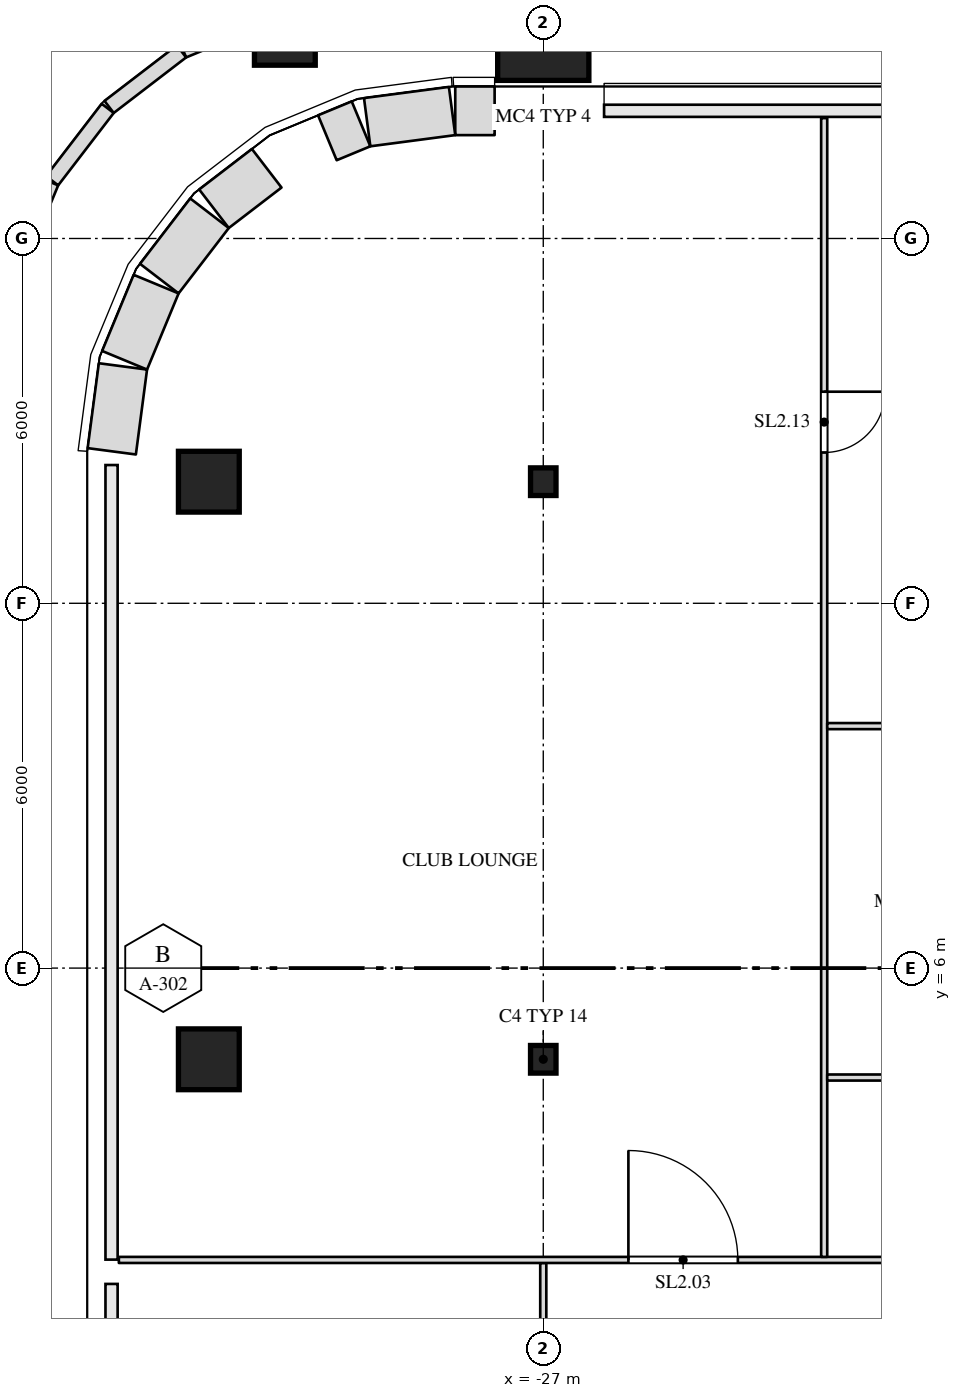
"""IFC4 building model, lengths in metres.
Left out: names, types, materials, properties, quantities, classifications, styles, units other than length and angle.
Written with IfcOpenShell. Run it as: python <this file> out.ifc"""

import sys

from ifc_helpers import new_model, si_unit, direction, frame, frame_2d, origin, origin_2d, place, context, subcontext, project, spatial, rectangle, i_section, extrude, clip, halfspace, element, fill, save


model = new_model("IFC4")
c1 = context("Model", 3, precision=1e-05, world=origin(), true_north=direction((0.0, 1.0)))
c2 = subcontext(c1, "Body", "Model", "MODEL_VIEW")
j1 = project(units=[si_unit("LENGTHUNIT", "METRE"), si_unit("PLANEANGLEUNIT", "RADIAN")], contexts=[c1])
p1 = place(None, origin())
s1 = spatial("IfcSite", under=j1, at=p1, CompositionType="ELEMENT")
p2 = place(p1, origin())
s2 = spatial("IfcBuilding", under=s1, at=p2, CompositionType="ELEMENT")
p3 = place(p2, frame((0.0, 0.0, 156.5)))
s3 = spatial("IfcBuildingStorey", under=s2, at=p3, CompositionType="ELEMENT", Elevation=156.5)
p4 = place(p3, frame((-32.5, 4.5, 0.0), z_axis=(0.0, 0.0, 1.0), x_axis=(1.0, 0.0, 0.0)))
e1 = element("IfcColumn", 1, at=p4, inside=s3, PredefinedType="COLUMN", context=c2, shape_type="SweptSolid", body=[
    extrude(rectangle(XDim=1.0, YDim=1.0, at=origin_2d()), origin(), (0.0, 0.0, 1.0), 4.0),
])
p5 = place(p3, frame((-27.0, 4.5, 0.0), z_axis=(0.0, 0.0, 1.0), x_axis=(1.0, 0.0, 0.0)))
e2 = element("IfcColumn", 2, at=p5, inside=s3, PredefinedType="COLUMN", context=c2, shape_type="SweptSolid", body=[
    extrude(i_section(OverallWidth=0.419, OverallDepth=0.455, WebThickness=0.042, FlangeThickness=0.068, at=origin_2d()), origin(), (0.0, 0.0, 1.0), 4.0),
])
p6 = place(p3, frame((-32.5, 14.0, 0.0), z_axis=(0.0, 0.0, 1.0), x_axis=(1.0, 0.0, 0.0)))
e3 = element("IfcColumn", 3, at=p6, inside=s3, PredefinedType="COLUMN", context=c2, shape_type="SweptSolid", body=[
    extrude(rectangle(XDim=1.0, YDim=1.0, at=origin_2d()), origin(), (0.0, 0.0, 1.0), 4.0),
])
p7 = place(p3, frame((-27.0, 14.0, 0.0), z_axis=(0.0, 0.0, 1.0), x_axis=(1.0, 0.0, 0.0)))
e4 = element("IfcColumn", 4, at=p7, inside=s3, PredefinedType="COLUMN", context=c2, shape_type="SweptSolid", body=[
    extrude(i_section(OverallWidth=0.419, OverallDepth=0.455, WebThickness=0.042, FlangeThickness=0.068, at=origin_2d()), origin(), (0.0, 0.0, 1.0), 4.0),
])
p8 = place(p3, frame((-31.25, 20.0, 0.0), z_axis=(0.0, 0.747409318684, 0.66436383883), x_axis=(-1.0, 0.0, 0.0)))
e5 = element("IfcColumn", 5, at=p8, inside=s3, PredefinedType="COLUMN", context=c2, shape_type="Clipping", body=[
    clip(extrude(rectangle(XDim=1.0, YDim=1.0, at=origin_2d()), origin(), (0.0, 0.0, 1.0), 6.021), halfspace(frame((0.0, 0.0, 0.562)), True)),
])
p9 = place(p3, frame((-27.0, 20.0, 0.0), z_axis=(0.0, 0.747409318684, 0.66436383883), x_axis=(-1.0, 0.0, 0.0)))
e6 = element("IfcColumn", 6, at=p9, inside=s3, PredefinedType="COLUMN", context=c2, shape_type="Clipping", body=[
    clip(extrude(rectangle(XDim=1.5, YDim=1.5, at=origin_2d()), origin(), (0.0, 0.0, 1.0), 6.021), halfspace(frame((0.0, 0.0, 0.844)), True)),
])
p10 = place(p3, frame((-27.0, -2.0, 0.0), z_axis=(0.0, 0.0, 1.0), x_axis=(0.0, 1.0, 0.0)))
e7 = element("IfcWall", 7, at=p10, inside=s3, PredefinedType="PARTITIONING", context=c2, shape_type="SweptSolid", body=[
    extrude(rectangle(XDim=3.15, YDim=0.1, at=frame_2d((1.575, 0.0))), origin(), (0.0, 0.0, 1.0), 3.038),
])
p11 = place(p10, frame((1.1, 0.0, 0.0)))
e8 = element("IfcOpeningElement", 8, at=p11, cuts=e7, PredefinedType="OPENING", context=c2, shape_type="SweptSolid", body=[
    extrude(rectangle(XDim=1.0, YDim=2.1, at=frame_2d((0.5, 1.05))), frame((0.0, 0.062, 0.0), z_axis=(0.0, -1.0, 0.0), x_axis=(1.0, 0.0, 0.0)), (0.0, 0.0, 1.0), 0.124),
])
p12 = place(p3, frame((-33.98, 1.2, 0.0), z_axis=(0.0, 0.0, 1.0), x_axis=(1.0, 0.0, 0.0)))
e9 = element("IfcWall", 9, at=p12, inside=s3, PredefinedType="PARTITIONING", context=c2, shape_type="SweptSolid", body=[
    extrude(rectangle(XDim=67.976, YDim=0.1, at=frame_2d((33.988, 0.0))), origin(), (0.0, 0.0, 1.0), 3.65),
])
p13 = place(p12, frame((8.38, 0.0, 0.0)))
e10 = element("IfcOpeningElement", 10, at=p13, cuts=e9, PredefinedType="OPENING", context=c2, shape_type="SweptSolid", body=[
    extrude(rectangle(XDim=1.8, YDim=2.1, at=frame_2d((0.9, 1.05))), frame((0.0, 0.062, 0.0), z_axis=(0.0, -1.0, 0.0), x_axis=(1.0, 0.0, 0.0)), (0.0, 0.0, 1.0), 0.124),
])
p14 = place(p12, frame((15.5, 0.0, 0.0)))
e11 = element("IfcOpeningElement", 11, at=p14, cuts=e9, PredefinedType="OPENING", context=c2, shape_type="SweptSolid", body=[
    extrude(rectangle(XDim=1.0, YDim=2.1, at=frame_2d((0.5, 1.05))), frame((0.0, 0.062, 0.0), z_axis=(0.0, -1.0, 0.0), x_axis=(1.0, 0.0, 0.0)), (0.0, 0.0, 1.0), 0.124),
])
p15 = place(p12, frame((24.01, 0.0, 0.0)))
e12 = element("IfcOpeningElement", 12, at=p15, cuts=e9, PredefinedType="OPENING", context=c2, shape_type="SweptSolid", body=[
    extrude(rectangle(XDim=1.8, YDim=2.1, at=frame_2d((0.9, 1.05))), frame((0.0, 0.062, 0.0), z_axis=(0.0, -1.0, 0.0), x_axis=(1.0, 0.0, 0.0)), (0.0, 0.0, 1.0), 0.124),
])
p16 = place(p12, frame((31.23, 0.0, 0.0)))
e13 = element("IfcOpeningElement", 13, at=p16, cuts=e9, PredefinedType="OPENING", context=c2, shape_type="SweptSolid", body=[
    extrude(rectangle(XDim=1.8, YDim=2.1, at=frame_2d((0.9, 1.05))), frame((0.0, 0.062, 0.0), z_axis=(0.0, -1.0, 0.0), x_axis=(1.0, 0.0, 0.0)), (0.0, 0.0, 1.0), 0.124),
])
p17 = place(p12, frame((44.66, 0.0, 0.0)))
e14 = element("IfcOpeningElement", 14, at=p17, cuts=e9, PredefinedType="OPENING", context=c2, shape_type="SweptSolid", body=[
    extrude(rectangle(XDim=1.8, YDim=2.1, at=frame_2d((0.9, 1.05))), frame((0.0, 0.062, 0.0), z_axis=(0.0, -1.0, 0.0), x_axis=(1.0, 0.0, 0.0)), (0.0, 0.0, 1.0), 0.124),
])
p18 = place(p12, frame((55.93, 0.0, 0.0)))
e15 = element("IfcOpeningElement", 15, at=p18, cuts=e9, PredefinedType="OPENING", context=c2, shape_type="SweptSolid", body=[
    extrude(rectangle(XDim=1.8, YDim=2.1, at=frame_2d((0.9, 1.05))), frame((0.0, 0.062, 0.0), z_axis=(0.0, -1.0, 0.0), x_axis=(1.0, 0.0, 0.0)), (0.0, 0.0, 1.0), 0.124),
])
p19 = place(p3, frame((-22.38, 1.25, 0.0), z_axis=(0.0, 0.0, 1.0), x_axis=(0.0, 1.0, 0.0)))
e16 = element("IfcWall", 16, at=p19, inside=s3, PredefinedType="PARTITIONING", context=c2, shape_type="SweptSolid", body=[
    extrude(rectangle(XDim=18.73, YDim=0.1, at=frame_2d((9.365, 0.0))), origin(), (0.0, 0.0, 1.0), 3.65),
])
p20 = place(p19, frame((13.23, 0.0, 0.0)))
e17 = element("IfcOpeningElement", 17, at=p20, cuts=e16, PredefinedType="OPENING", context=c2, shape_type="SweptSolid", body=[
    extrude(rectangle(XDim=1.0, YDim=2.1, at=frame_2d((0.5, 1.05))), frame((0.0, 0.062, 0.0), z_axis=(0.0, -1.0, 0.0), x_axis=(1.0, 0.0, 0.0)), (0.0, 0.0, 1.0), 0.124),
])
p21 = place(p3, frame((-22.33, 4.2, 0.0), z_axis=(0.0, 0.0, 1.0), x_axis=(1.0, 0.0, 0.0)))
e18 = element("IfcWall", 18, at=p21, inside=s3, PredefinedType="PARTITIONING", context=c2, shape_type="SweptSolid", body=[
    extrude(rectangle(XDim=8.66, YDim=0.1, at=frame_2d((4.33, 0.0))), origin(), (0.0, 0.0, 1.0), 3.65),
])
p22 = place(p21, frame((1.05, 0.0, 0.0)))
e19 = element("IfcOpeningElement", 19, at=p22, cuts=e18, PredefinedType="OPENING", context=c2, shape_type="SweptSolid", body=[
    extrude(rectangle(XDim=1.0, YDim=2.1, at=frame_2d((0.5, 1.05))), frame((0.0, 0.062, 0.0), z_axis=(0.0, -1.0, 0.0), x_axis=(1.0, 0.0, 0.0)), (0.0, 0.0, 1.0), 0.124),
])
p23 = place(p21, frame((4.91, 0.0, 0.0)))
e20 = element("IfcOpeningElement", 20, at=p23, cuts=e18, PredefinedType="OPENING", context=c2, shape_type="SweptSolid", body=[
    extrude(rectangle(XDim=1.0, YDim=2.1, at=frame_2d((0.5, 1.05))), frame((0.0, 0.062, 0.0), z_axis=(0.0, -1.0, 0.0), x_axis=(1.0, 0.0, 0.0)), (0.0, 0.0, 1.0), 0.124),
])
p24 = place(p21, frame((7.01, 0.0, 0.0)))
e21 = element("IfcOpeningElement", 21, at=p24, cuts=e18, PredefinedType="OPENING", context=c2, shape_type="SweptSolid", body=[
    extrude(rectangle(XDim=1.0, YDim=2.1, at=frame_2d((0.5, 1.05))), frame((0.0, 0.062, 0.0), z_axis=(0.0, -1.0, 0.0), x_axis=(1.0, 0.0, 0.0)), (0.0, 0.0, 1.0), 0.124),
])
p25 = place(p3, frame((-22.33, 9.98, 0.0), z_axis=(0.0, 0.0, 1.0), x_axis=(1.0, 0.0, 0.0)))
e22 = element("IfcWall", 22, at=p25, inside=s3, PredefinedType="PARTITIONING", context=c2, shape_type="SweptSolid", body=[
    extrude(rectangle(XDim=8.66, YDim=0.1, at=frame_2d((4.33, 0.0))), origin(), (0.0, 0.0, 1.0), 3.65),
])
p26 = place(p3, frame((-27.8, 20.1, 0.0), z_axis=(0.0, 0.0, 1.0), x_axis=(-1.0, 0.0, 0.0)))
e23 = element("IfcWall", 23, at=p26, inside=s3, PredefinedType="SOLIDWALL", context=c2, shape_type="SweptSolid", body=[
    extrude(rectangle(XDim=0.647, YDim=0.8, at=frame_2d((0.324, 0.0))), origin(), (0.0, 0.0, 1.0), 3.65),
])
p27 = place(p3, frame((-28.5, 20.097, 0.0), z_axis=(0.0, 0.0, 1.0), x_axis=(-0.99144603414, -0.130517283865, 0.0)))
e24 = element("IfcWall", 24, at=p27, inside=s3, PredefinedType="SOLIDWALL", context=c2, shape_type="SweptSolid", body=[
    extrude(rectangle(XDim=1.408, YDim=0.8, at=frame_2d((0.704, 0.0))), origin(), (0.0, 0.0, 1.0), 3.65),
])
p28 = place(p3, frame((-29.997, 19.886, 0.0), z_axis=(0.0, 0.0, 1.0), x_axis=(-0.923882723383, -0.382675728829, 0.0)))
e25 = element("IfcWall", 25, at=p28, inside=s3, PredefinedType="SOLIDWALL", context=c2, shape_type="SweptSolid", body=[
    extrude(rectangle(XDim=0.599, YDim=0.8, at=frame_2d((0.3, 0.0))), origin(), (0.0, 0.0, 1.0), 3.65),
])
p29 = place(p3, frame((-31.548, 19.155, 0.0), z_axis=(0.0, 0.0, 1.0), x_axis=(-0.793279231512, -0.60885799728, 0.0)))
e26 = element("IfcWall", 26, at=p29, inside=s3, PredefinedType="SOLIDWALL", context=c2, shape_type="SweptSolid", body=[
    extrude(rectangle(XDim=1.094, YDim=0.8, at=frame_2d((0.547, 0.0))), origin(), (0.0, 0.0, 1.0), 3.65),
])
p30 = place(p3, frame((-32.489, 18.416, 0.0), z_axis=(0.0, 0.0, 1.0), x_axis=(-0.608866226366, -0.793272915452, 0.0)))
e27 = element("IfcWall", 27, at=p30, inside=s3, PredefinedType="SOLIDWALL", context=c2, shape_type="SweptSolid", body=[
    extrude(rectangle(XDim=1.356, YDim=0.8, at=frame_2d((0.678, 0.0))), origin(), (0.0, 0.0, 1.0), 3.65),
])
p31 = place(p3, frame((-33.367, 17.25, 0.0), z_axis=(0.0, 0.0, 1.0), x_axis=(-0.38276009378, -0.923847774587, 0.0)))
e28 = element("IfcWall", 28, at=p31, inside=s3, PredefinedType="SOLIDWALL", context=c2, shape_type="SweptSolid", body=[
    extrude(rectangle(XDim=1.355, YDim=0.8, at=frame_2d((0.678, 0.0))), origin(), (0.0, 0.0, 1.0), 3.65),
])
p32 = place(p3, frame((-33.913, 15.896, 0.0), z_axis=(0.0, 0.0, 1.0), x_axis=(-0.130517283865, -0.99144603414, 0.0)))
e29 = element("IfcWall", 29, at=p32, inside=s3, PredefinedType="SOLIDWALL", context=c2, shape_type="SweptSolid", body=[
    extrude(rectangle(XDim=1.408, YDim=0.8, at=frame_2d((0.704, 0.0))), origin(), (0.0, 0.0, 1.0), 3.65),
])
for number, where, z_axis, x_axis in (
    (30, (-31.535, 21.667, 0.0), (0.0, 0.0, 1.0), (-0.924, -0.383, 0.0)),
    (31, (-32.95, 21.077, 0.0), (0.0, 0.0, 1.0), (-0.793, -0.609, 0.0)),
    (32, (-34.164, 20.14, 0.0), (0.0, 0.0, 1.0), (-0.609, -0.793, 0.0)),
    (33, (-35.093, 18.922, 0.0), (0.0, 0.0, 1.0), (-0.383, -0.924, 0.0)),
):
    element("IfcWall", number, at=place(p3, frame(where, z_axis=z_axis, x_axis=x_axis)), inside=s3, PredefinedType="PARAPET", context=c2, shape_type="SweptSolid", body=[
        extrude(rectangle(XDim=1.5, YDim=0.25, at=frame_2d((0.75, 0.0))), origin(), (0.0, 0.0, 1.0), 1.1),
    ])
p33 = place(p13, origin())
e34 = element("IfcDoor", 34, at=p33, inside=s3, OperationType="DOUBLE_DOOR_SINGLE_SWING", PredefinedType="DOOR", context=c2, shape_type="SweptSolid", body=[
    extrude(rectangle(XDim=1.8, YDim=2.1, at=frame_2d((0.9, 1.05))), frame((0.0, 0.025, 0.0), z_axis=(0.0, -1.0, 0.0), x_axis=(1.0, 0.0, 0.0)), (0.0, 0.0, 1.0), 0.05),
])
fill(e10, e34)
p34 = place(p20, origin())
e35 = element("IfcDoor", 35, at=p34, inside=s3, OperationType="SINGLE_SWING_LEFT", PredefinedType="DOOR", context=c2, shape_type="SweptSolid", body=[
    extrude(rectangle(XDim=1.0, YDim=2.1, at=frame_2d((0.5, 1.05))), frame((0.0, 0.025, 0.0), z_axis=(0.0, -1.0, 0.0), x_axis=(1.0, 0.0, 0.0)), (0.0, 0.0, 1.0), 0.05),
])
fill(e17, e35)
save(model, sys.argv[1])
